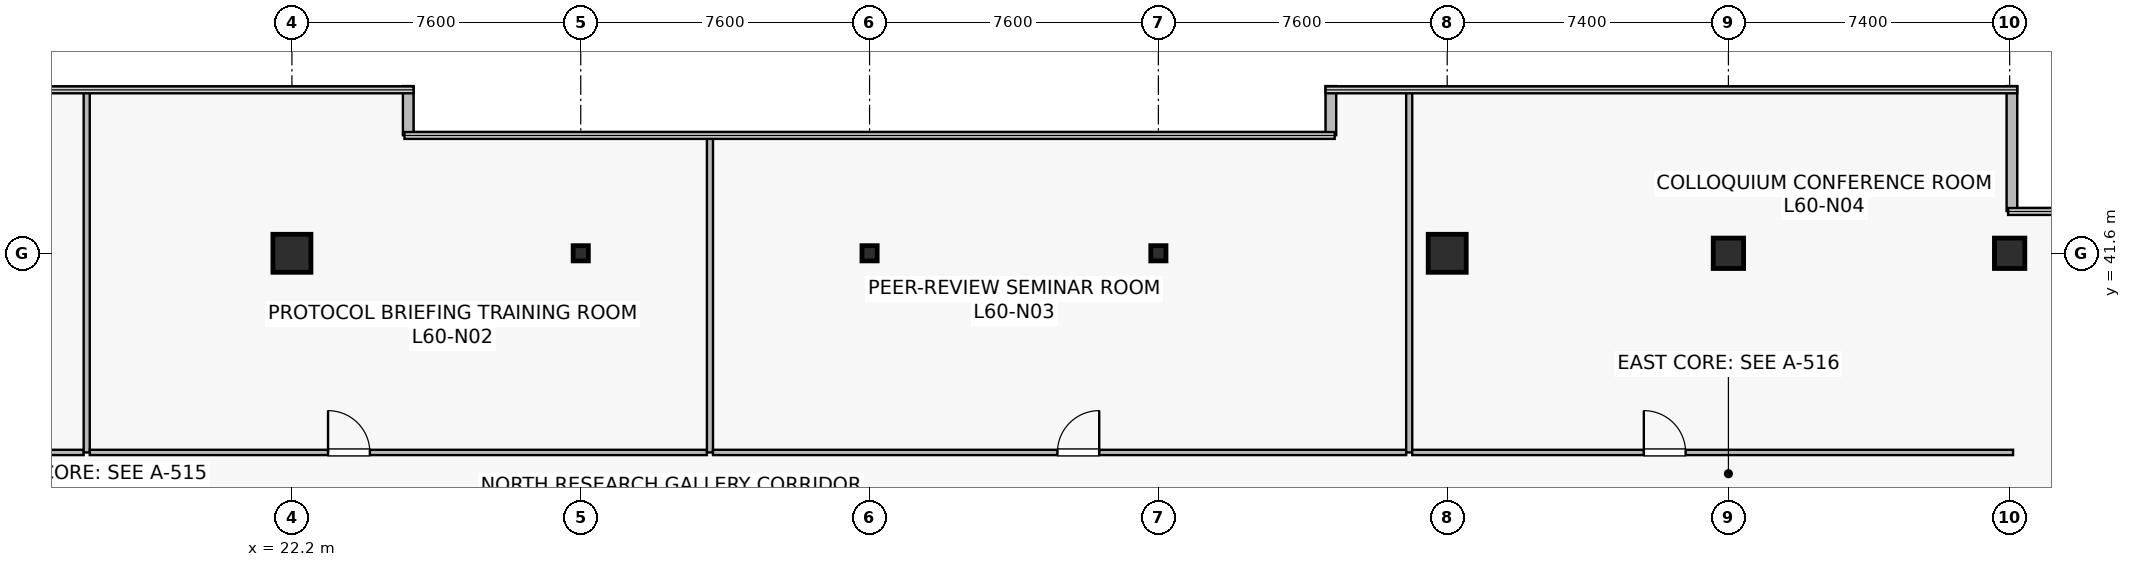
"""IFC4 building model, lengths in metres.
Left out: names, types, materials, properties, quantities, classifications, styles, units other than length and angle.
Written with IfcOpenShell. Run it as: python <this file> out.ifc"""

import sys

from ifc_helpers import new_model, si_unit, direction, frame, frame_2d, origin, origin_2d, place, context, subcontext, project, spatial, rectangle, hollow_rectangle, extrude, source, transform, mapped, element, fill, save


model = new_model("IFC4")
c1 = context("Model", 3, precision=1e-05, world=origin(), true_north=direction((0.0, 1.0)))
c2 = subcontext(c1, "Body", "Model", "MODEL_VIEW")
j1 = project(units=[si_unit("LENGTHUNIT", "METRE"), si_unit("PLANEANGLEUNIT", "RADIAN")], contexts=[c1])
p1 = place(None, origin())
s1 = spatial("IfcSite", under=j1, at=p1, CompositionType="ELEMENT")
p2 = place(p1, origin())
s2 = spatial("IfcBuilding", under=s1, at=p2, CompositionType="ELEMENT")
p3 = place(p2, frame((0.0, 0.0, 250.6)))
s3 = spatial("IfcBuildingStorey", under=s2, at=p3, CompositionType="ELEMENT", Elevation=250.6)
m1 = source(origin(), c2, "Body", "SweptSolid", [
    extrude(rectangle(XDim=1.0, YDim=1.0, at=origin_2d()), origin(), (0.0, 0.0, 1.0), 4.1),
])
for number, where, z_axis, x_axis in (
    (1, (22.2, 41.6, 0.0), (0.0, 0.0, 1.0), (1.0, 0.0, 0.0)),
    (2, (52.6, 41.6, 0.0), (0.0, 0.0, 1.0), (1.0, 0.0, 0.0)),
):
    element("IfcColumn", number, at=place(p3, frame(where, z_axis=z_axis, x_axis=x_axis)), inside=s3, PredefinedType="COLUMN", context=c2, shape_type="MappedRepresentation", body=[
        mapped(m1, transform((0.0, 0.0, 0.0), scale=1.0)),
    ])
m2 = source(origin(), c2, "Body", "SweptSolid", [
    extrude(rectangle(XDim=0.8, YDim=0.8, at=origin_2d()), origin(), (0.0, 0.0, 1.0), 4.1),
])
for number, where, z_axis, x_axis in (
    (3, (60.0, 41.6, 0.0), (0.0, 0.0, 1.0), (1.0, 0.0, 0.0)),
    (4, (67.4, 41.6, 0.0), (0.0, 0.0, 1.0), (1.0, 0.0, 0.0)),
):
    element("IfcColumn", number, at=place(p3, frame(where, z_axis=z_axis, x_axis=x_axis)), inside=s3, PredefinedType="COLUMN", context=c2, shape_type="MappedRepresentation", body=[
        mapped(m2, transform((0.0, 0.0, 0.0), scale=1.0)),
    ])
m3 = source(origin(), c2, "Body", "SweptSolid", [
    extrude(hollow_rectangle(XDim=0.4, YDim=0.4, WallThickness=0.019, at=origin_2d()), origin(), (0.0, 0.0, 1.0), 4.1),
])
for number, where, z_axis, x_axis in (
    (5, (29.8, 41.6, 0.0), (0.0, 0.0, 1.0), (1.0, 0.0, 0.0)),
    (6, (37.4, 41.6, 0.0), (0.0, 0.0, 1.0), (1.0, 0.0, 0.0)),
    (7, (45.0, 41.6, 0.0), (0.0, 0.0, 1.0), (1.0, 0.0, 0.0)),
):
    element("IfcColumn", number, at=place(p3, frame(where, z_axis=z_axis, x_axis=x_axis)), inside=s3, PredefinedType="COLUMN", context=c2, shape_type="MappedRepresentation", body=[
        mapped(m3, transform((0.0, 0.0, 0.0), scale=1.0)),
    ])
p4 = place(p3, frame((67.46, 42.712, 0.0), z_axis=(0.0, 0.0, 1.0), x_axis=(0.0, 1.0, 0.0)))
e8 = element("IfcWall", 8, at=p4, inside=s3, PredefinedType="STANDARD", context=c2, shape_type="SweptSolid", body=[
    extrude(rectangle(XDim=3.288, YDim=0.28, at=frame_2d((1.644, 0.0))), origin(), (0.0, 0.0, 1.0), 3.8),
])
for number, where, z_axis, x_axis in (
    (9, (49.54, 46.0, 0.0), (0.0, 0.0, 1.0), (0.0, -1.0, 0.0)),
    (10, (25.26, 44.707, 0.0), (0.0, 0.0, 1.0), (0.0, 1.0, 0.0)),
):
    element("IfcWall", number, at=place(p3, frame(where, z_axis=z_axis, x_axis=x_axis)), inside=s3, PredefinedType="STANDARD", context=c2, shape_type="SweptSolid", body=[
        extrude(rectangle(XDim=1.293, YDim=0.28, at=frame_2d((0.646, 0.0))), origin(), (0.0, 0.0, 1.0), 3.8),
    ])
p5 = place(p3, frame((7.31, 36.36, 0.0), z_axis=(0.0, 0.0, 1.0), x_axis=(1.0, 0.0, 0.0)))
e11 = element("IfcWall", 11, at=p5, inside=s3, PredefinedType="PARTITIONING", context=c2, shape_type="SweptSolid", body=[
    extrude(rectangle(XDim=9.41, YDim=0.14, at=frame_2d((4.705, 0.0))), origin(), (0.0, 0.0, 1.0), 3.197),
])
p6 = place(p5, frame((4.383, 0.0, 0.0)))
e12 = element("IfcOpeningElement", 12, at=p6, cuts=e11, PredefinedType="OPENING", context=c2, shape_type="SweptSolid", body=[
    extrude(rectangle(XDim=1.1, YDim=2.18, at=frame_2d((0.55, 1.09))), frame((0.0, 0.08, 0.0), z_axis=(0.0, -1.0, 0.0), x_axis=(1.0, 0.0, 0.0)), (0.0, 0.0, 1.0), 0.16),
])
p7 = place(p3, frame((16.8, 36.36, 0.0), z_axis=(0.0, 0.0, 1.0), x_axis=(0.0, 1.0, 0.0)))
e13 = element("IfcWall", 13, at=p7, inside=s3, PredefinedType="PARTITIONING", context=c2, shape_type="SweptSolid", body=[
    extrude(rectangle(XDim=9.53, YDim=0.16, at=frame_2d((4.765, 0.0))), origin(), (0.0, 0.0, 1.0), 3.135),
])
p8 = place(p3, frame((16.88, 36.36, 0.0), z_axis=(0.0, 0.0, 1.0), x_axis=(1.0, 0.0, 0.0)))
e14 = element("IfcWall", 14, at=p8, inside=s3, PredefinedType="PARTITIONING", context=c2, shape_type="SweptSolid", body=[
    extrude(rectangle(XDim=16.24, YDim=0.14, at=frame_2d((8.12, 0.0))), origin(), (0.0, 0.0, 1.0), 3.197),
])
p9 = place(p8, frame((6.271, 0.0, 0.0)))
e15 = element("IfcOpeningElement", 15, at=p9, cuts=e14, PredefinedType="OPENING", context=c2, shape_type="SweptSolid", body=[
    extrude(rectangle(XDim=1.1, YDim=2.18, at=frame_2d((0.55, 1.09))), frame((0.0, 0.08, 0.0), z_axis=(0.0, -1.0, 0.0), x_axis=(1.0, 0.0, 0.0)), (0.0, 0.0, 1.0), 0.16),
])
p10 = place(p3, frame((33.2, 36.36, 0.0), z_axis=(0.0, 0.0, 1.0), x_axis=(0.0, 1.0, 0.0)))
e16 = element("IfcWall", 16, at=p10, inside=s3, PredefinedType="PARTITIONING", context=c2, shape_type="SweptSolid", body=[
    extrude(rectangle(XDim=8.33, YDim=0.16, at=frame_2d((4.165, 0.0))), origin(), (0.0, 0.0, 1.0), 3.135),
])
p11 = place(p3, frame((33.28, 36.36, 0.0), z_axis=(0.0, 0.0, 1.0), x_axis=(1.0, 0.0, 0.0)))
e17 = element("IfcWall", 17, at=p11, inside=s3, PredefinedType="PARTITIONING", context=c2, shape_type="SweptSolid", body=[
    extrude(rectangle(XDim=18.24, YDim=0.14, at=frame_2d((9.12, 0.0))), origin(), (0.0, 0.0, 1.0), 3.197),
])
p12 = place(p11, frame((9.063, 0.0, 0.0)))
e18 = element("IfcOpeningElement", 18, at=p12, cuts=e17, PredefinedType="OPENING", context=c2, shape_type="SweptSolid", body=[
    extrude(rectangle(XDim=1.1, YDim=2.18, at=frame_2d((0.55, 1.09))), frame((0.0, 0.08, 0.0), z_axis=(0.0, -1.0, 0.0), x_axis=(1.0, 0.0, 0.0)), (0.0, 0.0, 1.0), 0.16),
])
p13 = place(p3, frame((51.6, 36.36, 0.0), z_axis=(0.0, 0.0, 1.0), x_axis=(0.0, 1.0, 0.0)))
e19 = element("IfcWall", 19, at=p13, inside=s3, PredefinedType="PARTITIONING", context=c2, shape_type="SweptSolid", body=[
    extrude(rectangle(XDim=9.53, YDim=0.16, at=frame_2d((4.765, 0.0))), origin(), (0.0, 0.0, 1.0), 3.135),
])
p14 = place(p3, frame((51.68, 36.36, 0.0), z_axis=(0.0, 0.0, 1.0), x_axis=(1.0, 0.0, 0.0)))
e20 = element("IfcWall", 20, at=p14, inside=s3, PredefinedType="PARTITIONING", context=c2, shape_type="SweptSolid", body=[
    extrude(rectangle(XDim=15.81, YDim=0.14, at=frame_2d((7.905, 0.0))), origin(), (0.0, 0.0, 1.0), 3.197),
])
p15 = place(p14, frame((6.094, 0.0, 0.0)))
e21 = element("IfcOpeningElement", 21, at=p15, cuts=e20, PredefinedType="OPENING", context=c2, shape_type="SweptSolid", body=[
    extrude(rectangle(XDim=1.1, YDim=2.18, at=frame_2d((0.55, 1.09))), frame((0.0, 0.08, 0.0), z_axis=(0.0, -1.0, 0.0), x_axis=(1.0, 0.0, 0.0)), (0.0, 0.0, 1.0), 0.16),
])
m4 = source(origin(), c2, "Body", "SweptSolid", [
    extrude(rectangle(XDim=1.1, YDim=2.18, at=frame_2d((0.55, 1.09))), frame((0.0, 0.025, 0.0), z_axis=(0.0, -1.0, 0.0), x_axis=(1.0, 0.0, 0.0)), (0.0, 0.0, 1.0), 0.05),
])
p16 = place(p9, origin())
e22 = element("IfcDoor", 22, at=p16, inside=s3, OperationType="SINGLE_SWING_LEFT", PredefinedType="DOOR", context=c2, shape_type="MappedRepresentation", body=[
    mapped(m4, transform((0.0, 0.0, 0.0), scale=1.0)),
])
fill(e15, e22)
p17 = place(p12, origin())
e23 = element("IfcDoor", 23, at=p17, inside=s3, OperationType="SINGLE_SWING_RIGHT", PredefinedType="DOOR", context=c2, shape_type="MappedRepresentation", body=[
    mapped(m4, transform((0.0, 0.0, 0.0), scale=1.0)),
])
fill(e18, e23)
p18 = place(p15, origin())
e24 = element("IfcDoor", 24, at=p18, inside=s3, OperationType="SINGLE_SWING_LEFT", PredefinedType="DOOR", context=c2, shape_type="MappedRepresentation", body=[
    mapped(m4, transform((0.0, 0.0, 0.0), scale=1.0)),
])
fill(e21, e24)
save(model, sys.argv[1])
